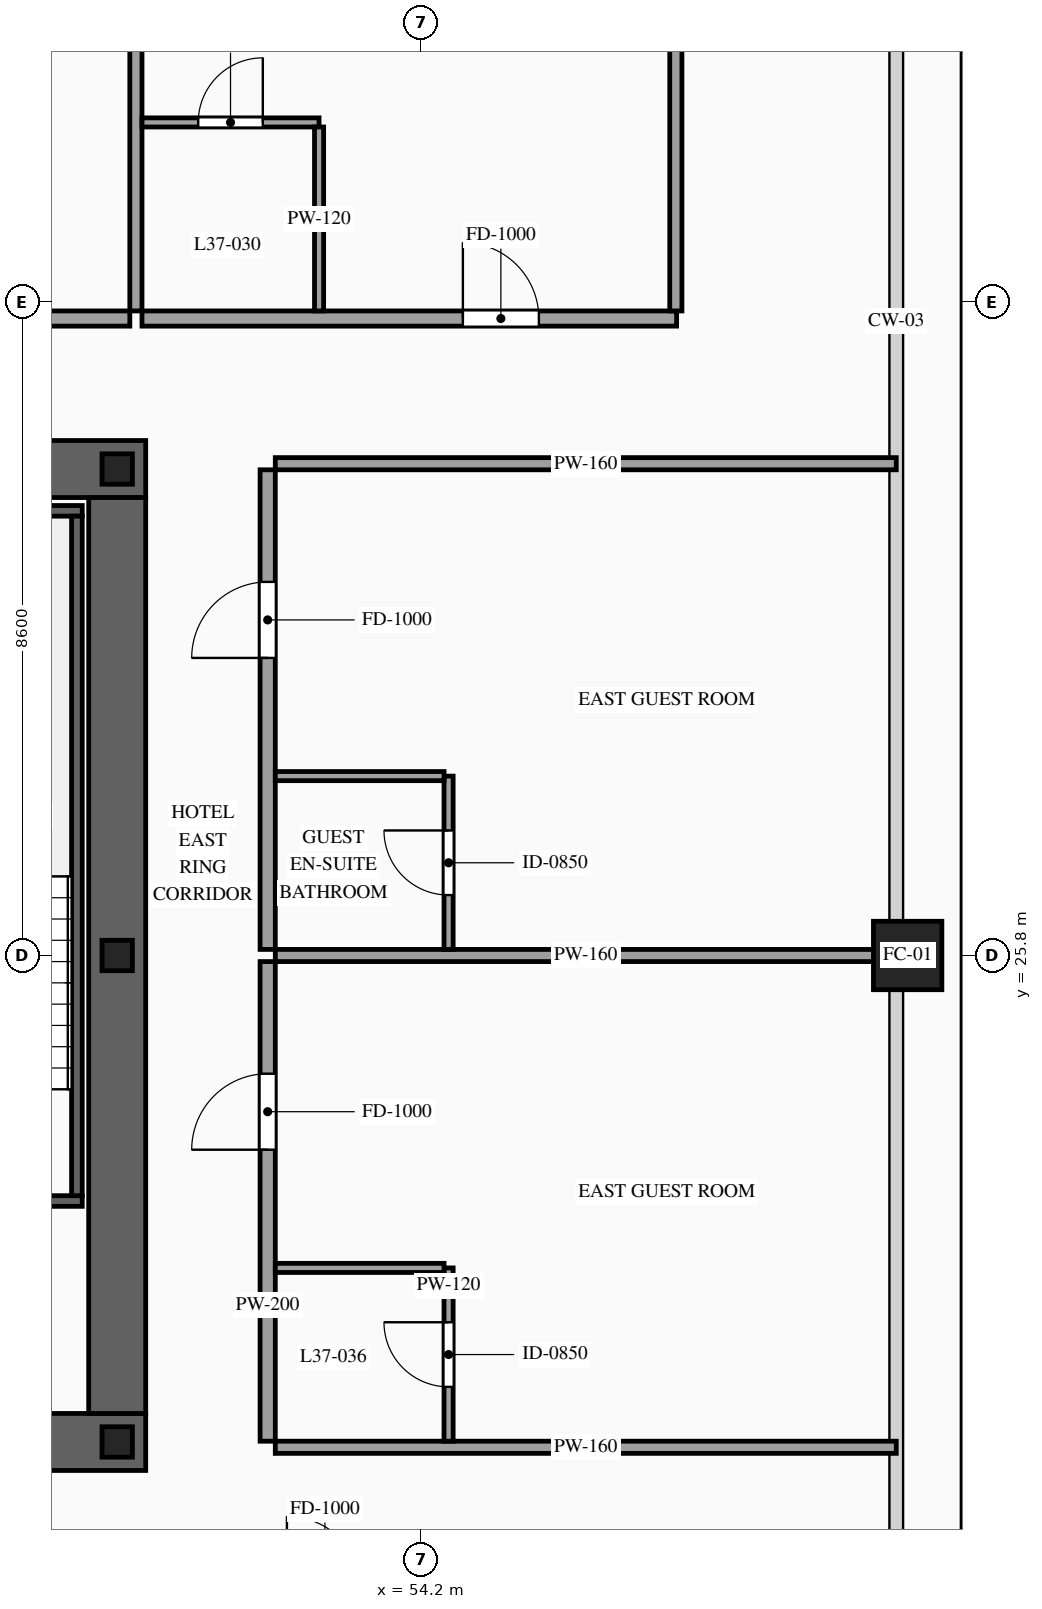
"""IFC4 building model, lengths in metres.
Left out: names, types, materials, properties, quantities, classifications, styles, units other than length and angle.
Written with IfcOpenShell. Run it as: python <this file> out.ifc"""

import sys

from ifc_helpers import new_model, si_unit, direction, frame, frame_2d, origin, origin_2d, place, context, subcontext, project, spatial, rectangle, hollow_rectangle, i_section, extrude, source, transform, mapped, element, fill, save


model = new_model("IFC4")
c1 = context("Model", 3, precision=1e-05, world=origin(), true_north=direction((0.0, 1.0)))
c2 = subcontext(c1, "Body", "Model", "MODEL_VIEW")
j1 = project(units=[si_unit("LENGTHUNIT", "METRE"), si_unit("PLANEANGLEUNIT", "RADIAN")], contexts=[c1])
p1 = place(None, origin())
s1 = spatial("IfcSite", under=j1, at=p1, CompositionType="ELEMENT")
p2 = place(p1, origin())
s2 = spatial("IfcBuilding", under=s1, at=p2, CompositionType="ELEMENT")
p3 = place(p2, frame((0.0, 0.0, 141.6)))
s3 = spatial("IfcBuildingStorey", under=s2, at=p3, CompositionType="ELEMENT", Elevation=141.6)
p4 = place(p3, frame((23.425, 19.4, 0.0), z_axis=(0.0, 0.0, 1.0), x_axis=(1.0, 0.0, 0.0)))
e1 = element("IfcWall", 1, at=p4, inside=s3, PredefinedType="SHEAR", context=c2, shape_type="SweptSolid", body=[
    extrude(rectangle(XDim=27.15, YDim=0.75, at=frame_2d((13.575, 0.0))), origin(), (0.0, 0.0, 1.0), 3.6),
])
p5 = place(p4, frame((2.025, 0.0, 0.0)))
e2 = element("IfcOpeningElement", 2, at=p5, cuts=e1, PredefinedType="OPENING", context=c2, shape_type="SweptSolid", body=[
    extrude(rectangle(XDim=1.1, YDim=2.2, at=frame_2d((0.55, 1.1))), frame((0.0, 0.39, 0.0), z_axis=(0.0, -1.0, 0.0), x_axis=(1.0, 0.0, 0.0)), (0.0, 0.0, 1.0), 0.78),
])
p6 = place(p4, frame((9.925, 0.0, 0.0)))
e3 = element("IfcOpeningElement", 3, at=p6, cuts=e1, PredefinedType="OPENING", context=c2, shape_type="SweptSolid", body=[
    extrude(rectangle(XDim=1.1, YDim=2.2, at=frame_2d((0.55, 1.1))), frame((0.0, 0.39, 0.0), z_axis=(0.0, -1.0, 0.0), x_axis=(1.0, 0.0, 0.0)), (0.0, 0.0, 1.0), 0.78),
])
p7 = place(p4, frame((23.125, 0.0, 0.0)))
e4 = element("IfcOpeningElement", 4, at=p7, cuts=e1, PredefinedType="OPENING", context=c2, shape_type="SweptSolid", body=[
    extrude(rectangle(XDim=1.1, YDim=2.2, at=frame_2d((0.55, 1.1))), frame((0.0, 0.39, 0.0), z_axis=(0.0, -1.0, 0.0), x_axis=(1.0, 0.0, 0.0)), (0.0, 0.0, 1.0), 0.78),
])
p8 = place(p4, frame((19.745, 0.0, 0.0)))
e5 = element("IfcOpeningElement", 5, at=p8, cuts=e1, PredefinedType="OPENING", context=c2, shape_type="SweptSolid", body=[
    extrude(rectangle(XDim=0.9, YDim=2.15, at=frame_2d((0.45, 1.075))), frame((0.0, 0.39, 0.0), z_axis=(0.0, -1.0, 0.0), x_axis=(1.0, 0.0, 0.0)), (0.0, 0.0, 1.0), 0.78),
])
p9 = place(p4, frame((18.305, 0.0, 0.0)))
e6 = element("IfcOpeningElement", 6, at=p9, cuts=e1, PredefinedType="OPENING", context=c2, shape_type="SweptSolid", body=[
    extrude(rectangle(XDim=0.9, YDim=2.15, at=frame_2d((0.45, 1.075))), frame((0.0, 0.39, 0.0), z_axis=(0.0, -1.0, 0.0), x_axis=(1.0, 0.0, 0.0)), (0.0, 0.0, 1.0), 0.78),
])
p10 = place(p3, frame((23.425, 32.2, 0.0), z_axis=(0.0, 0.0, 1.0), x_axis=(1.0, 0.0, 0.0)))
e7 = element("IfcWall", 7, at=p10, inside=s3, PredefinedType="SHEAR", context=c2, shape_type="SweptSolid", body=[
    extrude(rectangle(XDim=27.15, YDim=0.75, at=frame_2d((13.575, 0.0))), origin(), (0.0, 0.0, 1.0), 3.6),
])
p11 = place(p10, frame((4.645, 0.0, 0.0)))
e8 = element("IfcOpeningElement", 8, at=p11, cuts=e7, PredefinedType="OPENING", context=c2, shape_type="SweptSolid", body=[
    extrude(rectangle(XDim=0.9, YDim=2.15, at=frame_2d((0.45, 1.075))), frame((0.0, 0.39, 0.0), z_axis=(0.0, -1.0, 0.0), x_axis=(1.0, 0.0, 0.0)), (0.0, 0.0, 1.0), 0.78),
])
p12 = place(p10, frame((9.925, 0.0, 0.0)))
e9 = element("IfcOpeningElement", 9, at=p12, cuts=e7, PredefinedType="OPENING", context=c2, shape_type="SweptSolid", body=[
    extrude(rectangle(XDim=1.1, YDim=2.2, at=frame_2d((0.55, 1.1))), frame((0.0, 0.39, 0.0), z_axis=(0.0, -1.0, 0.0), x_axis=(1.0, 0.0, 0.0)), (0.0, 0.0, 1.0), 0.78),
])
p13 = place(p10, frame((15.775, 0.0, 0.0)))
e10 = element("IfcOpeningElement", 10, at=p13, cuts=e7, PredefinedType="OPENING", context=c2, shape_type="SweptSolid", body=[
    extrude(rectangle(XDim=1.1, YDim=2.2, at=frame_2d((0.55, 1.1))), frame((0.0, 0.39, 0.0), z_axis=(0.0, -1.0, 0.0), x_axis=(1.0, 0.0, 0.0)), (0.0, 0.0, 1.0), 0.78),
])
p14 = place(p10, frame((18.975, 0.0, 0.0)))
e11 = element("IfcOpeningElement", 11, at=p14, cuts=e7, PredefinedType="OPENING", context=c2, shape_type="SweptSolid", body=[
    extrude(rectangle(XDim=0.9, YDim=2.15, at=frame_2d((0.45, 1.075))), frame((0.0, 0.39, 0.0), z_axis=(0.0, -1.0, 0.0), x_axis=(1.0, 0.0, 0.0)), (0.0, 0.0, 1.0), 0.78),
])
m1 = source(origin(), c2, "Body", "SweptSolid", [
    extrude(rectangle(XDim=12.05, YDim=0.75, at=frame_2d((6.025, 0.0))), origin(), (0.0, 0.0, 1.0), 3.6),
])
p15 = place(p3, frame((50.2, 19.775, 0.0), z_axis=(0.0, 0.0, 1.0), x_axis=(0.0, 1.0, 0.0)))
e12 = element("IfcWall", 12, at=p15, inside=s3, PredefinedType="SHEAR", context=c2, shape_type="MappedRepresentation", body=[
    mapped(m1, transform((0.0, 0.0, 0.0), scale=1.0)),
])
m2 = source(origin(), c2, "Body", "SweptSolid", [
    extrude(i_section(OverallWidth=0.4, OverallDepth=0.4, WebThickness=0.013, FlangeThickness=0.021, at=origin_2d()), origin(), (0.0, 0.0, 1.0), 3.6),
])
for number, where, z_axis, x_axis in (
    (13, (50.2, 19.4, 0.0), (0.0, 0.0, 1.0), (1.0, 0.0, 0.0)),
    (14, (50.2, 25.8, 0.0), (0.0, 0.0, 1.0), (1.0, 0.0, 0.0)),
    (15, (50.2, 32.2, 0.0), (0.0, 0.0, 1.0), (1.0, 0.0, 0.0)),
):
    element("IfcColumn", number, at=place(p3, frame(where, z_axis=z_axis, x_axis=x_axis)), inside=s3, PredefinedType="COLUMN", context=c2, shape_type="MappedRepresentation", body=[
        mapped(m2, transform((0.0, 0.0, 0.0), scale=1.0)),
    ])
m3 = source(origin(), c2, "Body", "SweptSolid", [
    extrude(hollow_rectangle(XDim=0.9, YDim=0.9, WallThickness=0.042, at=origin_2d()), origin(), (0.0, 0.0, 1.0), 3.6),
])
p16 = place(p3, frame((60.6, 25.8, 0.0), z_axis=(0.0, 0.0, 1.0), x_axis=(1.0, 0.0, 0.0)))
e16 = element("IfcColumn", 16, at=p16, inside=s3, PredefinedType="COLUMN", context=c2, shape_type="MappedRepresentation", body=[
    mapped(m3, transform((0.0, 0.0, 0.0), scale=1.0)),
])
p17 = place(p3, frame((46.46, 22.57, 0.0), z_axis=(0.0, 0.0, 1.0), x_axis=(1.0, 0.0, 0.0)))
e17 = element("IfcWall", 17, at=p17, inside=s3, PredefinedType="SOLIDWALL", context=c2, shape_type="SweptSolid", body=[
    extrude(rectangle(XDim=3.28, YDim=0.14, at=frame_2d((1.64, 0.0))), origin(), (0.0, 0.0, 1.0), 3.38),
])
p18 = place(p17, frame((1.09, 0.0, 0.0)))
e18 = element("IfcOpeningElement", 18, at=p18, cuts=e17, PredefinedType="OPENING", context=c2, shape_type="SweptSolid", body=[
    extrude(rectangle(XDim=1.1, YDim=2.2, at=frame_2d((0.55, 1.1))), frame((0.0, 0.085, 0.0), z_axis=(0.0, -1.0, 0.0), x_axis=(1.0, 0.0, 0.0)), (0.0, 0.0, 1.0), 0.17),
])
m4 = source(origin(), c2, "Body", "SweptSolid", [
    extrude(rectangle(XDim=3.28, YDim=0.14, at=frame_2d((1.64, 0.0))), origin(), (0.0, 0.0, 1.0), 3.38),
])
p19 = place(p3, frame((46.46, 31.65, 0.0), z_axis=(0.0, 0.0, 1.0), x_axis=(1.0, 0.0, 0.0)))
e19 = element("IfcWall", 19, at=p19, inside=s3, PredefinedType="SOLIDWALL", context=c2, shape_type="MappedRepresentation", body=[
    mapped(m4, transform((0.0, 0.0, 0.0), scale=1.0)),
])
m5 = source(origin(), c2, "Body", "SweptSolid", [
    extrude(rectangle(XDim=8.94, YDim=0.14, at=frame_2d((4.47, 0.0))), origin(), (0.0, 0.0, 1.0), 3.38),
])
p20 = place(p3, frame((49.67, 22.64, 0.0), z_axis=(0.0, 0.0, 1.0), x_axis=(0.0, 1.0, 0.0)))
e20 = element("IfcWall", 20, at=p20, inside=s3, PredefinedType="SOLIDWALL", context=c2, shape_type="MappedRepresentation", body=[
    mapped(m5, transform((0.0, 0.0, 0.0), scale=1.0)),
])
p21 = place(p3, frame((39.342, 34.18, 0.0), z_axis=(0.0, 0.0, 1.0), x_axis=(1.0, 0.0, 0.0)))
e21 = element("IfcWall", 21, at=p21, inside=s3, PredefinedType="PARTITIONING", context=c2, shape_type="SweptSolid", body=[
    extrude(rectangle(XDim=11.024, YDim=0.2, at=frame_2d((5.512, 0.0))), origin(), (0.0, 0.0, 1.0), 3.38),
])
p22 = place(p21, frame((5.012, 0.0, 0.0)))
e22 = element("IfcOpeningElement", 22, at=p22, cuts=e21, PredefinedType="OPENING", context=c2, shape_type="SweptSolid", body=[
    extrude(rectangle(XDim=1.0, YDim=2.2, at=frame_2d((0.5, 1.1))), frame((0.0, 0.115, 0.0), z_axis=(0.0, -1.0, 0.0), x_axis=(1.0, 0.0, 0.0)), (0.0, 0.0, 1.0), 0.23),
])
m6 = source(origin(), c2, "Body", "SweptSolid", [
    extrude(rectangle(XDim=14.97, YDim=0.16, at=frame_2d((7.485, 0.0))), origin(), (0.0, 0.0, 1.0), 3.38),
])
p23 = place(p3, frame((50.446, 34.28, 0.0), z_axis=(0.0, 0.0, 1.0), x_axis=(0.0, 1.0, 0.0)))
e23 = element("IfcWall", 23, at=p23, inside=s3, PredefinedType="PARTITIONING", context=c2, shape_type="MappedRepresentation", body=[
    mapped(m6, transform((0.0, 0.0, 0.0), scale=1.0)),
])
p24 = place(p3, frame((50.526, 34.18, 0.0), z_axis=(0.0, 0.0, 1.0), x_axis=(1.0, 0.0, 0.0)))
e24 = element("IfcWall", 24, at=p24, inside=s3, PredefinedType="PARTITIONING", context=c2, shape_type="SweptSolid", body=[
    extrude(rectangle(XDim=7.034, YDim=0.2, at=frame_2d((3.517, 0.0))), origin(), (0.0, 0.0, 1.0), 3.38),
])
p25 = place(p24, frame((4.222, 0.0, 0.0)))
e25 = element("IfcOpeningElement", 25, at=p25, cuts=e24, PredefinedType="OPENING", context=c2, shape_type="SweptSolid", body=[
    extrude(rectangle(XDim=1.0, YDim=2.2, at=frame_2d((0.5, 1.1))), frame((0.0, 0.115, 0.0), z_axis=(0.0, -1.0, 0.0), x_axis=(1.0, 0.0, 0.0)), (0.0, 0.0, 1.0), 0.23),
])
m7 = source(origin(), c2, "Body", "SweptSolid", [
    extrude(rectangle(XDim=14.82, YDim=0.16, at=frame_2d((7.41, 0.0))), origin(), (0.0, 0.0, 1.0), 3.38),
])
p26 = place(p3, frame((57.55, 34.28, 0.0), z_axis=(0.0, 0.0, 1.0), x_axis=(0.0, 1.0, 0.0)))
e26 = element("IfcWall", 26, at=p26, inside=s3, PredefinedType="PARTITIONING", context=c2, shape_type="MappedRepresentation", body=[
    mapped(m7, transform((0.0, 0.0, 0.0), scale=1.0)),
])
p27 = place(p3, frame((50.526, 36.76, 0.0), z_axis=(0.0, 0.0, 1.0), x_axis=(1.0, 0.0, 0.0)))
e27 = element("IfcWall", 27, at=p27, inside=s3, PredefinedType="PARTITIONING", context=c2, shape_type="SweptSolid", body=[
    extrude(rectangle(XDim=2.33, YDim=0.12, at=frame_2d((1.165, 0.0))), origin(), (0.0, 0.0, 1.0), 3.38),
])
p28 = place(p27, frame((0.74, 0.0, 0.0)))
e28 = element("IfcOpeningElement", 28, at=p28, cuts=e27, PredefinedType="OPENING", context=c2, shape_type="SweptSolid", body=[
    extrude(rectangle(XDim=0.85, YDim=2.1, at=frame_2d((0.425, 1.05))), frame((0.0, 0.075, 0.0), z_axis=(0.0, -1.0, 0.0), x_axis=(1.0, 0.0, 0.0)), (0.0, 0.0, 1.0), 0.15),
])
m8 = source(origin(), c2, "Body", "SweptSolid", [
    extrude(rectangle(XDim=2.42, YDim=0.12, at=frame_2d((1.21, 0.0))), origin(), (0.0, 0.0, 1.0), 3.38),
])
p29 = place(p3, frame((52.856, 34.28, 0.0), z_axis=(0.0, 0.0, 1.0), x_axis=(0.0, 1.0, 0.0)))
e29 = element("IfcWall", 29, at=p29, inside=s3, PredefinedType="PARTITIONING", context=c2, shape_type="MappedRepresentation", body=[
    mapped(m8, transform((0.0, 0.0, 0.0), scale=1.0)),
])
p30 = place(p3, frame((52.18, 19.41, 0.0), z_axis=(0.0, 0.0, 1.0), x_axis=(0.0, 1.0, 0.0)))
e30 = element("IfcWall", 30, at=p30, inside=s3, PredefinedType="PARTITIONING", context=c2, shape_type="SweptSolid", body=[
    extrude(rectangle(XDim=6.31, YDim=0.2, at=frame_2d((3.155, 0.0))), origin(), (0.0, 0.0, 1.0), 3.38),
])
p31 = place(p30, frame((3.835, 0.0, 0.0)))
e31 = element("IfcOpeningElement", 31, at=p31, cuts=e30, PredefinedType="OPENING", context=c2, shape_type="SweptSolid", body=[
    extrude(rectangle(XDim=1.0, YDim=2.2, at=frame_2d((0.5, 1.1))), frame((0.0, 0.115, 0.0), z_axis=(0.0, -1.0, 0.0), x_axis=(1.0, 0.0, 0.0)), (0.0, 0.0, 1.0), 0.23),
])
m9 = source(origin(), c2, "Body", "SweptSolid", [
    extrude(rectangle(XDim=8.17, YDim=0.16, at=frame_2d((4.085, 0.0))), origin(), (0.0, 0.0, 1.0), 2.675),
])
p32 = place(p3, frame((52.28, 25.8, 0.0), z_axis=(0.0, 0.0, 1.0), x_axis=(1.0, 0.0, 0.0)))
e32 = element("IfcWall", 32, at=p32, inside=s3, PredefinedType="PARTITIONING", context=c2, shape_type="MappedRepresentation", body=[
    mapped(m9, transform((0.0, 0.0, 0.0), scale=1.0)),
])
m10 = source(origin(), c2, "Body", "SweptSolid", [
    extrude(rectangle(XDim=8.17, YDim=0.16, at=frame_2d((4.085, 0.0))), origin(), (0.0, 0.0, 1.0), 2.875),
])
p33 = place(p3, frame((52.28, 19.33, 0.0), z_axis=(0.0, 0.0, 1.0), x_axis=(1.0, 0.0, 0.0)))
e33 = element("IfcWall", 33, at=p33, inside=s3, PredefinedType="PARTITIONING", context=c2, shape_type="MappedRepresentation", body=[
    mapped(m10, transform((0.0, 0.0, 0.0), scale=1.0)),
])
p34 = place(p3, frame((54.56, 19.41, 0.0), z_axis=(0.0, 0.0, 1.0), x_axis=(0.0, 1.0, 0.0)))
e34 = element("IfcWall", 34, at=p34, inside=s3, PredefinedType="PARTITIONING", context=c2, shape_type="SweptSolid", body=[
    extrude(rectangle(XDim=2.28, YDim=0.12, at=frame_2d((1.14, 0.0))), origin(), (0.0, 0.0, 1.0), 3.38),
])
p35 = place(p34, frame((0.715, 0.0, 0.0)))
e35 = element("IfcOpeningElement", 35, at=p35, cuts=e34, PredefinedType="OPENING", context=c2, shape_type="SweptSolid", body=[
    extrude(rectangle(XDim=0.85, YDim=2.1, at=frame_2d((0.425, 1.05))), frame((0.0, 0.075, 0.0), z_axis=(0.0, -1.0, 0.0), x_axis=(1.0, 0.0, 0.0)), (0.0, 0.0, 1.0), 0.15),
])
m11 = source(origin(), c2, "Body", "SweptSolid", [
    extrude(rectangle(XDim=2.22, YDim=0.12, at=frame_2d((1.11, 0.0))), origin(), (0.0, 0.0, 1.0), 3.38),
])
p36 = place(p3, frame((52.28, 21.69, 0.0), z_axis=(0.0, 0.0, 1.0), x_axis=(1.0, 0.0, 0.0)))
e36 = element("IfcWall", 36, at=p36, inside=s3, PredefinedType="PARTITIONING", context=c2, shape_type="MappedRepresentation", body=[
    mapped(m11, transform((0.0, 0.0, 0.0), scale=1.0)),
])
p37 = place(p3, frame((52.18, 25.88, 0.0), z_axis=(0.0, 0.0, 1.0), x_axis=(0.0, 1.0, 0.0)))
e37 = element("IfcWall", 37, at=p37, inside=s3, PredefinedType="PARTITIONING", context=c2, shape_type="SweptSolid", body=[
    extrude(rectangle(XDim=6.31, YDim=0.2, at=frame_2d((3.155, 0.0))), origin(), (0.0, 0.0, 1.0), 3.38),
])
p38 = place(p37, frame((3.835, 0.0, 0.0)))
e38 = element("IfcOpeningElement", 38, at=p38, cuts=e37, PredefinedType="OPENING", context=c2, shape_type="SweptSolid", body=[
    extrude(rectangle(XDim=1.0, YDim=2.2, at=frame_2d((0.5, 1.1))), frame((0.0, 0.115, 0.0), z_axis=(0.0, -1.0, 0.0), x_axis=(1.0, 0.0, 0.0)), (0.0, 0.0, 1.0), 0.23),
])
p39 = place(p3, frame((52.28, 32.27, 0.0), z_axis=(0.0, 0.0, 1.0), x_axis=(1.0, 0.0, 0.0)))
e39 = element("IfcWall", 39, at=p39, inside=s3, PredefinedType="PARTITIONING", context=c2, shape_type="MappedRepresentation", body=[
    mapped(m10, transform((0.0, 0.0, 0.0), scale=1.0)),
])
p40 = place(p3, frame((54.56, 25.88, 0.0), z_axis=(0.0, 0.0, 1.0), x_axis=(0.0, 1.0, 0.0)))
e40 = element("IfcWall", 40, at=p40, inside=s3, PredefinedType="PARTITIONING", context=c2, shape_type="SweptSolid", body=[
    extrude(rectangle(XDim=2.28, YDim=0.12, at=frame_2d((1.14, 0.0))), origin(), (0.0, 0.0, 1.0), 3.38),
])
p41 = place(p40, frame((0.715, 0.0, 0.0)))
e41 = element("IfcOpeningElement", 41, at=p41, cuts=e40, PredefinedType="OPENING", context=c2, shape_type="SweptSolid", body=[
    extrude(rectangle(XDim=0.85, YDim=2.1, at=frame_2d((0.425, 1.05))), frame((0.0, 0.075, 0.0), z_axis=(0.0, -1.0, 0.0), x_axis=(1.0, 0.0, 0.0)), (0.0, 0.0, 1.0), 0.15),
])
p42 = place(p3, frame((52.28, 28.16, 0.0), z_axis=(0.0, 0.0, 1.0), x_axis=(1.0, 0.0, 0.0)))
e42 = element("IfcWall", 42, at=p42, inside=s3, PredefinedType="PARTITIONING", context=c2, shape_type="MappedRepresentation", body=[
    mapped(m11, transform((0.0, 0.0, 0.0), scale=1.0)),
])
m12 = source(origin(), c2, "Body", "SweptSolid", [
    extrude(rectangle(XDim=1.0, YDim=2.2, at=frame_2d((0.5, 1.1))), frame((0.0, 0.025, 0.0), z_axis=(0.0, -1.0, 0.0), x_axis=(1.0, 0.0, 0.0)), (0.0, 0.0, 1.0), 0.05),
])
p43 = place(p25, origin())
e43 = element("IfcDoor", 43, at=p43, inside=s3, OperationType="SINGLE_SWING_LEFT", PredefinedType="DOOR", context=c2, shape_type="MappedRepresentation", body=[
    mapped(m12, transform((0.0, 0.0, 0.0), scale=1.0)),
])
fill(e25, e43)
m13 = source(origin(), c2, "Body", "SweptSolid", [
    extrude(rectangle(XDim=0.85, YDim=2.1, at=frame_2d((0.425, 1.05))), frame((0.0, 0.025, 0.0), z_axis=(0.0, -1.0, 0.0), x_axis=(1.0, 0.0, 0.0)), (0.0, 0.0, 1.0), 0.05),
])
p44 = place(p28, origin())
e44 = element("IfcDoor", 44, at=p44, inside=s3, OperationType="SINGLE_SWING_RIGHT", PredefinedType="DOOR", context=c2, shape_type="MappedRepresentation", body=[
    mapped(m13, transform((0.0, 0.0, 0.0), scale=1.0)),
])
fill(e28, e44)
p45 = place(p31, origin())
e45 = element("IfcDoor", 45, at=p45, inside=s3, OperationType="SINGLE_SWING_LEFT", PredefinedType="DOOR", context=c2, shape_type="MappedRepresentation", body=[
    mapped(m12, transform((0.0, 0.0, 0.0), scale=1.0)),
])
fill(e31, e45)
p46 = place(p35, origin())
e46 = element("IfcDoor", 46, at=p46, inside=s3, OperationType="SINGLE_SWING_RIGHT", PredefinedType="DOOR", context=c2, shape_type="MappedRepresentation", body=[
    mapped(m13, transform((0.0, 0.0, 0.0), scale=1.0)),
])
fill(e35, e46)
p47 = place(p38, origin())
e47 = element("IfcDoor", 47, at=p47, inside=s3, OperationType="SINGLE_SWING_LEFT", PredefinedType="DOOR", context=c2, shape_type="MappedRepresentation", body=[
    mapped(m12, transform((0.0, 0.0, 0.0), scale=1.0)),
])
fill(e38, e47)
p48 = place(p41, origin())
e48 = element("IfcDoor", 48, at=p48, inside=s3, OperationType="SINGLE_SWING_RIGHT", PredefinedType="DOOR", context=c2, shape_type="MappedRepresentation", body=[
    mapped(m13, transform((0.0, 0.0, 0.0), scale=1.0)),
])
fill(e41, e48)
save(model, sys.argv[1])
